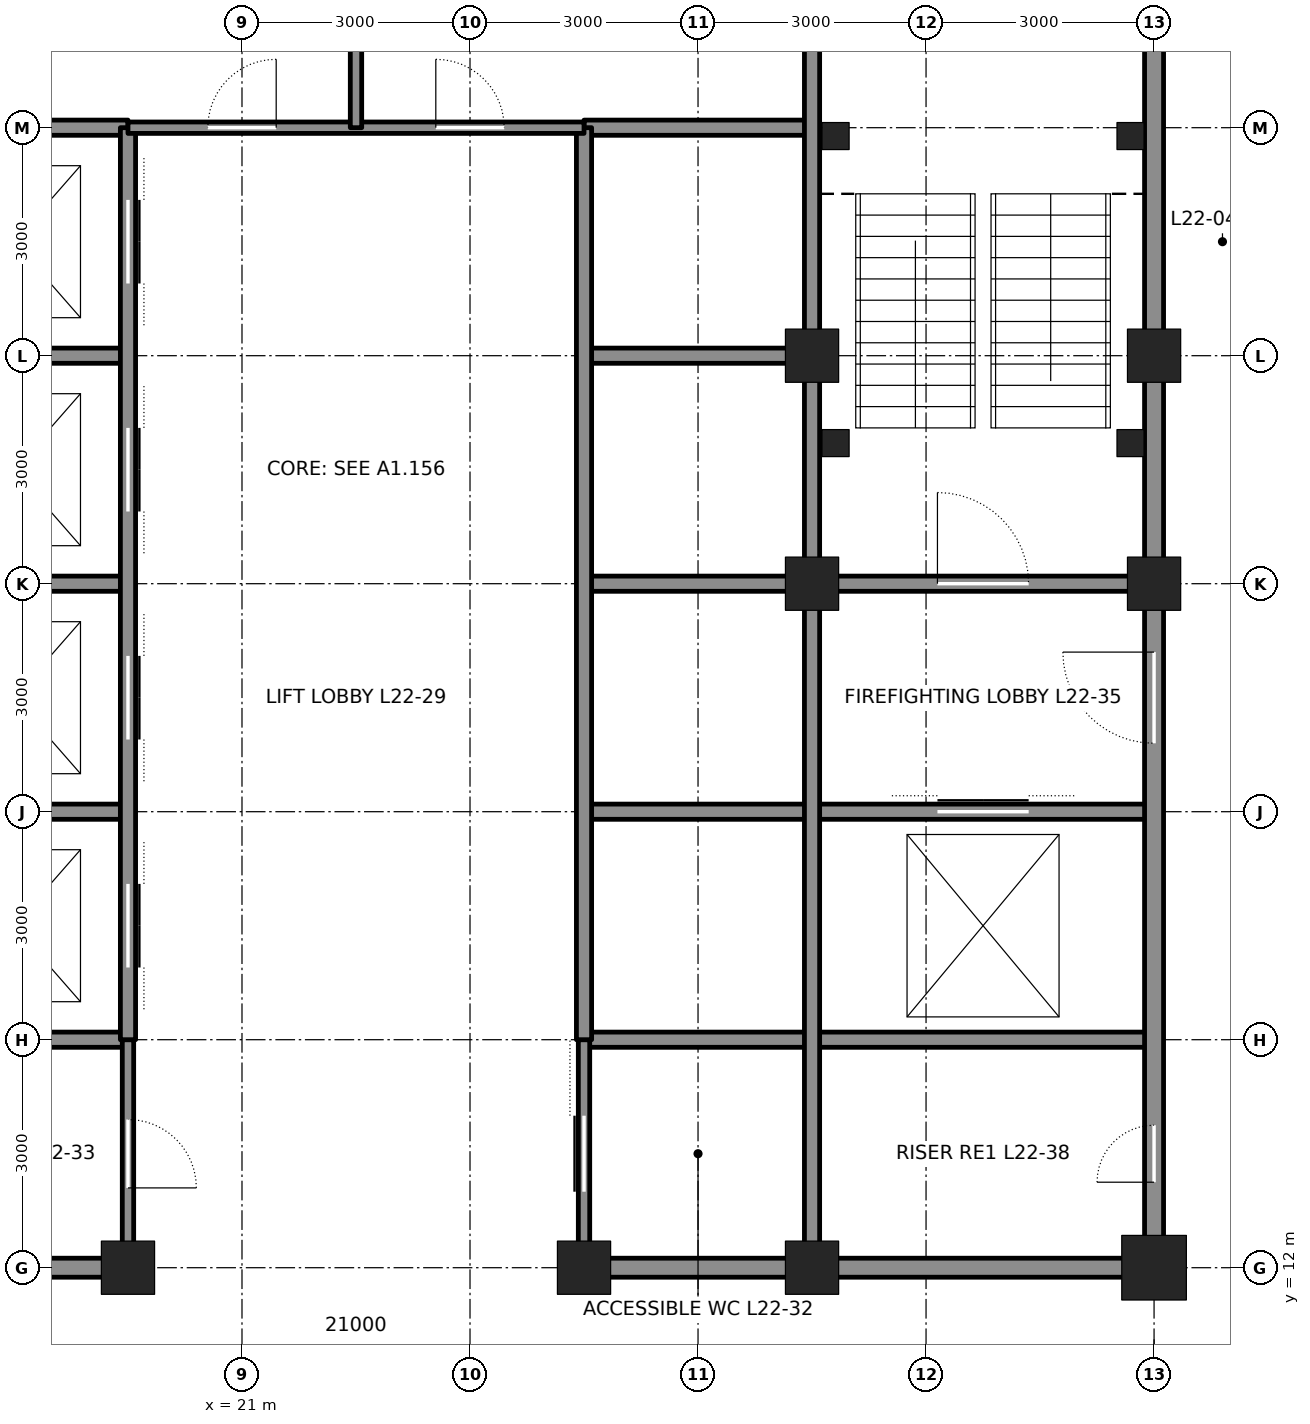
"""IFC4 building model, lengths in metres.
Left out: names, types, materials, properties, quantities, classifications, styles, units other than length and angle.
Written with IfcOpenShell. Run it as: python <this file> out.ifc"""

import sys

from ifc_helpers import new_model, si_unit, direction, frame, frame_2d, origin, origin_2d, place, context, subcontext, project, spatial, rectangle, hollow_rectangle, extrude, element, fill, save


model = new_model("IFC4")
c1 = context("Model", 3, precision=1e-05, world=origin(), true_north=direction((0.0, 1.0)))
c2 = subcontext(c1, "Body", "Model", "MODEL_VIEW")
j1 = project(units=[si_unit("LENGTHUNIT", "METRE"), si_unit("PLANEANGLEUNIT", "RADIAN")], contexts=[c1])
p1 = place(None, origin())
s1 = spatial("IfcSite", under=j1, at=p1, CompositionType="ELEMENT")
p2 = place(p1, origin())
s2 = spatial("IfcBuilding", under=s1, at=p2, CompositionType="ELEMENT")
p3 = place(p2, frame((0.0, 0.0, 106.8)))
s3 = spatial("IfcBuildingStorey", under=s2, at=p3, CompositionType="ELEMENT", Elevation=106.8)
for number, where, z_axis, x_axis in (
    (1, (19.5, 12.0, 0.0), (0.0, 0.0, 1.0), (1.0, 0.0, 0.0)),
    (2, (25.5, 12.0, 0.0), (0.0, 0.0, 1.0), (1.0, 0.0, 0.0)),
    (3, (28.5, 12.0, 0.0), (0.0, 0.0, 1.0), (1.0, 0.0, 0.0)),
):
    element("IfcColumn", number, at=place(p3, frame(where, z_axis=z_axis, x_axis=x_axis)), inside=s3, PredefinedType="COLUMN", context=c2, shape_type="SweptSolid", body=[
        extrude(hollow_rectangle(XDim=0.7, YDim=0.7, WallThickness=0.07, at=origin_2d()), origin(), (0.0, 0.0, 1.0), 4.2),
    ])
p4 = place(p3, frame((33.0, 12.0, 0.0), z_axis=(0.0, 0.0, 1.0), x_axis=(1.0, 0.0, 0.0)))
e4 = element("IfcColumn", 4, at=p4, inside=s3, PredefinedType="COLUMN", context=c2, shape_type="SweptSolid", body=[
    extrude(hollow_rectangle(XDim=0.85, YDim=0.85, WallThickness=0.085, at=origin_2d()), origin(), (0.0, 0.0, 1.0), 4.2),
])
for number, where, z_axis, x_axis in (
    (5, (33.0, 21.0, 0.0), (0.0, 0.0, 1.0), (1.0, 0.0, 0.0)),
    (6, (33.0, 24.0, 0.0), (0.0, 0.0, 1.0), (1.0, 0.0, 0.0)),
    (7, (28.5, 21.0, 0.0), (0.0, 0.0, 1.0), (1.0, 0.0, 0.0)),
    (8, (28.5, 24.0, 0.0), (0.0, 0.0, 1.0), (1.0, 0.0, 0.0)),
):
    element("IfcColumn", number, at=place(p3, frame(where, z_axis=z_axis, x_axis=x_axis)), inside=s3, PredefinedType="COLUMN", context=c2, shape_type="SweptSolid", body=[
        extrude(hollow_rectangle(XDim=0.7, YDim=0.7, WallThickness=0.07, at=origin_2d()), origin(), (0.0, 0.0, 1.0), 4.2),
    ])
for number, where, z_axis, x_axis in (
    (9, (16.75, 12.0, 0.0), (0.0, 0.0, 1.0), (1.0, 0.0, 0.0)),
    (10, (25.75, 12.0, 0.0), (0.0, 0.0, 1.0), (1.0, 0.0, 0.0)),
):
    element("IfcWall", number, at=place(p3, frame(where, z_axis=z_axis, x_axis=x_axis)), inside=s3, PredefinedType="SOLIDWALL", context=c2, shape_type="SweptSolid", body=[
        extrude(rectangle(XDim=2.5, YDim=0.25, at=frame_2d((1.25, 0.0))), origin(), (0.0, 0.0, 1.0), 3.181),
    ])
p5 = place(p3, frame((28.75, 12.0, 0.0), z_axis=(0.0, 0.0, 1.0), x_axis=(1.0, 0.0, 0.0)))
e11 = element("IfcWall", 11, at=p5, inside=s3, PredefinedType="SOLIDWALL", context=c2, shape_type="SweptSolid", body=[
    extrude(rectangle(XDim=4.0, YDim=0.25, at=frame_2d((2.0, 0.0))), origin(), (0.0, 0.0, 1.0), 3.181),
])
for number, where, z_axis, x_axis in (
    (12, (12.0, 15.0, 0.0), (0.0, 0.0, 1.0), (1.0, 0.0, 0.0)),
    (13, (25.5, 15.0, 0.0), (0.0, 0.0, 1.0), (1.0, 0.0, 0.0)),
):
    element("IfcWall", number, at=place(p3, frame(where, z_axis=z_axis, x_axis=x_axis)), inside=s3, PredefinedType="SOLIDWALL", context=c2, shape_type="SweptSolid", body=[
        extrude(rectangle(XDim=7.5, YDim=0.2, at=frame_2d((3.75, 0.0))), origin(), (0.0, 0.0, 1.0), 4.04),
    ])
for number, where, z_axis, x_axis in (
    (14, (16.75, 24.0, 0.0), (0.0, 0.0, 1.0), (1.0, 0.0, 0.0)),
    (15, (25.5, 24.0, 0.0), (0.0, 0.0, 1.0), (1.0, 0.0, 0.0)),
):
    element("IfcWall", number, at=place(p3, frame(where, z_axis=z_axis, x_axis=x_axis)), inside=s3, PredefinedType="SOLIDWALL", context=c2, shape_type="SweptSolid", body=[
        extrude(rectangle(XDim=2.75, YDim=0.2, at=frame_2d((1.375, 0.0))), origin(), (0.0, 0.0, 1.0), 3.09),
    ])
p6 = place(p3, frame((12.0, 27.0, 0.0), z_axis=(0.0, 0.0, 1.0), x_axis=(1.0, 0.0, 0.0)))
e16 = element("IfcWall", 16, at=p6, inside=s3, PredefinedType="SOLIDWALL", context=c2, shape_type="SweptSolid", body=[
    extrude(rectangle(XDim=7.5, YDim=0.2, at=frame_2d((3.75, 0.0))), origin(), (0.0, 0.0, 1.0), 4.04),
])
p7 = place(p6, frame((1.65, 0.0, 0.0)))
e17 = element("IfcOpeningElement", 17, at=p7, cuts=e16, PredefinedType="OPENING", context=c2, shape_type="SweptSolid", body=[
    extrude(rectangle(XDim=1.2, YDim=2.1, at=frame_2d((0.6, 1.05))), frame((0.0, 0.11, 0.0), z_axis=(0.0, -1.0, 0.0), x_axis=(1.0, 0.0, 0.0)), (0.0, 0.0, 1.0), 0.22),
])
for number, where, z_axis, x_axis in (
    (18, (25.5, 27.0, 0.0), (0.0, 0.0, 1.0), (1.0, 0.0, 0.0)),
    (19, (16.5, 18.0, 0.0), (0.0, 0.0, 1.0), (1.0, 0.0, 0.0)),
):
    element("IfcWall", number, at=place(p3, frame(where, z_axis=z_axis, x_axis=x_axis)), inside=s3, PredefinedType="SOLIDWALL", context=c2, shape_type="SweptSolid", body=[
        extrude(rectangle(XDim=3.0, YDim=0.2, at=frame_2d((1.5, 0.0))), origin(), (0.0, 0.0, 1.0), 4.04),
    ])
p8 = place(p3, frame((25.5, 18.0, 0.0), z_axis=(0.0, 0.0, 1.0), x_axis=(1.0, 0.0, 0.0)))
e20 = element("IfcWall", 20, at=p8, inside=s3, PredefinedType="SOLIDWALL", context=c2, shape_type="SweptSolid", body=[
    extrude(rectangle(XDim=7.5, YDim=0.2, at=frame_2d((3.75, 0.0))), origin(), (0.0, 0.0, 1.0), 4.04),
])
p9 = place(p8, frame((4.65, 0.0, 0.0)))
e21 = element("IfcOpeningElement", 21, at=p9, cuts=e20, PredefinedType="OPENING", context=c2, shape_type="SweptSolid", body=[
    extrude(rectangle(XDim=1.2, YDim=2.1, at=frame_2d((0.6, 1.05))), frame((0.0, 0.11, 0.0), z_axis=(0.0, -1.0, 0.0), x_axis=(1.0, 0.0, 0.0)), (0.0, 0.0, 1.0), 0.22),
])
for number, where, z_axis, x_axis in (
    (22, (16.75, 21.0, 0.0), (0.0, 0.0, 1.0), (1.0, 0.0, 0.0)),
    (23, (25.5, 21.0, 0.0), (0.0, 0.0, 1.0), (1.0, 0.0, 0.0)),
):
    element("IfcWall", number, at=place(p3, frame(where, z_axis=z_axis, x_axis=x_axis)), inside=s3, PredefinedType="SOLIDWALL", context=c2, shape_type="SweptSolid", body=[
        extrude(rectangle(XDim=2.75, YDim=0.2, at=frame_2d((1.375, 0.0))), origin(), (0.0, 0.0, 1.0), 3.09),
    ])
p10 = place(p3, frame((28.75, 21.0, 0.0), z_axis=(0.0, 0.0, 1.0), x_axis=(1.0, 0.0, 0.0)))
e24 = element("IfcWall", 24, at=p10, inside=s3, PredefinedType="SOLIDWALL", context=c2, shape_type="SweptSolid", body=[
    extrude(rectangle(XDim=4.0, YDim=0.2, at=frame_2d((2.0, 0.0))), origin(), (0.0, 0.0, 1.0), 3.09),
])
p11 = place(p10, frame((1.4, 0.0, 0.0)))
e25 = element("IfcOpeningElement", 25, at=p11, cuts=e24, PredefinedType="OPENING", context=c2, shape_type="SweptSolid", body=[
    extrude(rectangle(XDim=1.2, YDim=2.1, at=frame_2d((0.6, 1.05))), frame((0.0, 0.11, 0.0), z_axis=(0.0, -1.0, 0.0), x_axis=(1.0, 0.0, 0.0)), (0.0, 0.0, 1.0), 0.22),
])
p12 = place(p3, frame((19.5, 12.25, 0.0), z_axis=(0.0, 0.0, 1.0), x_axis=(0.0, 1.0, 0.0)))
e26 = element("IfcWall", 26, at=p12, inside=s3, PredefinedType="PARTITIONING", context=c2, shape_type="SweptSolid", body=[
    extrude(rectangle(XDim=2.75, YDim=0.15, at=frame_2d((1.375, 0.0))), origin(), (0.0, 0.0, 1.0), 3.064),
])
p13 = place(p12, frame((0.8, 0.0, 0.0)))
e27 = element("IfcOpeningElement", 27, at=p13, cuts=e26, PredefinedType="OPENING", context=c2, shape_type="SweptSolid", body=[
    extrude(rectangle(XDim=0.9, YDim=2.1, at=frame_2d((0.45, 1.05))), frame((0.0, 0.085, 0.0), z_axis=(0.0, -1.0, 0.0), x_axis=(1.0, 0.0, 0.0)), (0.0, 0.0, 1.0), 0.17),
])
p14 = place(p3, frame((19.5, 15.0, 0.0), z_axis=(0.0, 0.0, 1.0), x_axis=(0.0, 1.0, 0.0)))
e28 = element("IfcWall", 28, at=p14, inside=s3, PredefinedType="SOLIDWALL", context=c2, shape_type="SweptSolid", body=[
    extrude(rectangle(XDim=12.0, YDim=0.2, at=frame_2d((6.0, 0.0))), origin(), (0.0, 0.0, 1.0), 3.064),
])
p15 = place(p14, frame((0.95, 0.0, 0.0)))
e29 = element("IfcOpeningElement", 29, at=p15, cuts=e28, PredefinedType="OPENING", context=c2, shape_type="SweptSolid", body=[
    extrude(rectangle(XDim=1.1, YDim=2.1, at=frame_2d((0.55, 1.05))), frame((0.0, 0.11, 0.0), z_axis=(0.0, -1.0, 0.0), x_axis=(1.0, 0.0, 0.0)), (0.0, 0.0, 1.0), 0.22),
])
p16 = place(p14, frame((3.95, 0.0, 0.0)))
e30 = element("IfcOpeningElement", 30, at=p16, cuts=e28, PredefinedType="OPENING", context=c2, shape_type="SweptSolid", body=[
    extrude(rectangle(XDim=1.1, YDim=2.1, at=frame_2d((0.55, 1.05))), frame((0.0, 0.11, 0.0), z_axis=(0.0, -1.0, 0.0), x_axis=(1.0, 0.0, 0.0)), (0.0, 0.0, 1.0), 0.22),
])
p17 = place(p14, frame((6.95, 0.0, 0.0)))
e31 = element("IfcOpeningElement", 31, at=p17, cuts=e28, PredefinedType="OPENING", context=c2, shape_type="SweptSolid", body=[
    extrude(rectangle(XDim=1.1, YDim=2.1, at=frame_2d((0.55, 1.05))), frame((0.0, 0.11, 0.0), z_axis=(0.0, -1.0, 0.0), x_axis=(1.0, 0.0, 0.0)), (0.0, 0.0, 1.0), 0.22),
])
p18 = place(p14, frame((9.95, 0.0, 0.0)))
e32 = element("IfcOpeningElement", 32, at=p18, cuts=e28, PredefinedType="OPENING", context=c2, shape_type="SweptSolid", body=[
    extrude(rectangle(XDim=1.1, YDim=2.1, at=frame_2d((0.55, 1.05))), frame((0.0, 0.11, 0.0), z_axis=(0.0, -1.0, 0.0), x_axis=(1.0, 0.0, 0.0)), (0.0, 0.0, 1.0), 0.22),
])
p19 = place(p3, frame((25.5, 12.25, 0.0), z_axis=(0.0, 0.0, 1.0), x_axis=(0.0, 1.0, 0.0)))
e33 = element("IfcWall", 33, at=p19, inside=s3, PredefinedType="PARTITIONING", context=c2, shape_type="SweptSolid", body=[
    extrude(rectangle(XDim=2.75, YDim=0.15, at=frame_2d((1.375, 0.0))), origin(), (0.0, 0.0, 1.0), 3.064),
])
p20 = place(p19, frame((0.75, 0.0, 0.0)))
e34 = element("IfcOpeningElement", 34, at=p20, cuts=e33, PredefinedType="OPENING", context=c2, shape_type="SweptSolid", body=[
    extrude(rectangle(XDim=1.0, YDim=2.1, at=frame_2d((0.5, 1.05))), frame((0.0, 0.085, 0.0), z_axis=(0.0, -1.0, 0.0), x_axis=(1.0, 0.0, 0.0)), (0.0, 0.0, 1.0), 0.17),
])
p21 = place(p3, frame((25.5, 15.0, 0.0), z_axis=(0.0, 0.0, 1.0), x_axis=(0.0, 1.0, 0.0)))
e35 = element("IfcWall", 35, at=p21, inside=s3, PredefinedType="SOLIDWALL", context=c2, shape_type="SweptSolid", body=[
    extrude(rectangle(XDim=12.0, YDim=0.2, at=frame_2d((6.0, 0.0))), origin(), (0.0, 0.0, 1.0), 3.064),
])
p22 = place(p3, frame((28.5, 12.25, 0.0), z_axis=(0.0, 0.0, 1.0), x_axis=(0.0, 1.0, 0.0)))
e36 = element("IfcWall", 36, at=p22, inside=s3, PredefinedType="SOLIDWALL", context=c2, shape_type="SweptSolid", body=[
    extrude(rectangle(XDim=8.5, YDim=0.2, at=frame_2d((4.25, 0.0))), origin(), (0.0, 0.0, 1.0), 3.113),
])
p23 = place(p3, frame((28.5, 21.25, 0.0), z_axis=(0.0, 0.0, 1.0), x_axis=(0.0, 1.0, 0.0)))
e37 = element("IfcWall", 37, at=p23, inside=s3, PredefinedType="SOLIDWALL", context=c2, shape_type="SweptSolid", body=[
    extrude(rectangle(XDim=2.5, YDim=0.2, at=frame_2d((1.25, 0.0))), origin(), (0.0, 0.0, 1.0), 3.113),
])
p24 = place(p3, frame((28.5, 24.25, 0.0), z_axis=(0.0, 0.0, 1.0), x_axis=(0.0, 1.0, 0.0)))
e38 = element("IfcWall", 38, at=p24, inside=s3, PredefinedType="SOLIDWALL", context=c2, shape_type="SweptSolid", body=[
    extrude(rectangle(XDim=8.5, YDim=0.2, at=frame_2d((4.25, 0.0))), origin(), (0.0, 0.0, 1.0), 3.113),
])
p25 = place(p3, frame((33.0, 12.25, 0.0), z_axis=(0.0, 0.0, 1.0), x_axis=(0.0, 1.0, 0.0)))
e39 = element("IfcWall", 39, at=p25, inside=s3, PredefinedType="SOLIDWALL", context=c2, shape_type="SweptSolid", body=[
    extrude(rectangle(XDim=8.5, YDim=0.25, at=frame_2d((4.25, 0.0))), origin(), (0.0, 0.0, 1.0), 3.113),
])
p26 = place(p25, frame((6.65, 0.0, 0.0)))
e40 = element("IfcOpeningElement", 40, at=p26, cuts=e39, PredefinedType="OPENING", context=c2, shape_type="SweptSolid", body=[
    extrude(rectangle(XDim=1.2, YDim=2.1, at=frame_2d((0.6, 1.05))), frame((0.0, 0.135, 0.0), z_axis=(0.0, -1.0, 0.0), x_axis=(1.0, 0.0, 0.0)), (0.0, 0.0, 1.0), 0.27),
])
p27 = place(p25, frame((0.875, 0.0, 0.0)))
e41 = element("IfcOpeningElement", 41, at=p27, cuts=e39, PredefinedType="OPENING", context=c2, shape_type="SweptSolid", body=[
    extrude(rectangle(XDim=0.75, YDim=2.1, at=frame_2d((0.375, 1.05))), frame((0.0, 0.135, 0.0), z_axis=(0.0, -1.0, 0.0), x_axis=(1.0, 0.0, 0.0)), (0.0, 0.0, 1.0), 0.27),
])
p28 = place(p3, frame((33.0, 21.25, 0.0), z_axis=(0.0, 0.0, 1.0), x_axis=(0.0, 1.0, 0.0)))
e42 = element("IfcWall", 42, at=p28, inside=s3, PredefinedType="SOLIDWALL", context=c2, shape_type="SweptSolid", body=[
    extrude(rectangle(XDim=2.5, YDim=0.25, at=frame_2d((1.25, 0.0))), origin(), (0.0, 0.0, 1.0), 3.113),
])
p29 = place(p3, frame((33.0, 24.25, 0.0), z_axis=(0.0, 0.0, 1.0), x_axis=(0.0, 1.0, 0.0)))
e43 = element("IfcWall", 43, at=p29, inside=s3, PredefinedType="SOLIDWALL", context=c2, shape_type="SweptSolid", body=[
    extrude(rectangle(XDim=8.5, YDim=0.25, at=frame_2d((4.25, 0.0))), origin(), (0.0, 0.0, 1.0), 3.113),
])
p30 = place(p29, frame((6.875, 0.0, 0.0)))
e44 = element("IfcOpeningElement", 44, at=p30, cuts=e43, PredefinedType="OPENING", context=c2, shape_type="SweptSolid", body=[
    extrude(rectangle(XDim=0.75, YDim=2.1, at=frame_2d((0.375, 1.05))), frame((0.0, 0.135, 0.0), z_axis=(0.0, -1.0, 0.0), x_axis=(1.0, 0.0, 0.0)), (0.0, 0.0, 1.0), 0.27),
])
p31 = place(p3, frame((19.5, 27.0, 0.0), z_axis=(0.0, 0.0, 1.0), x_axis=(1.0, 0.0, 0.0)))
e45 = element("IfcWall", 45, at=p31, inside=s3, PredefinedType="PARTITIONING", context=c2, shape_type="SweptSolid", body=[
    extrude(rectangle(XDim=6.0, YDim=0.15, at=frame_2d((3.0, 0.0))), origin(), (0.0, 0.0, 1.0), 4.04),
])
p32 = place(p31, frame((1.05, 0.0, 0.0)))
e46 = element("IfcOpeningElement", 46, at=p32, cuts=e45, PredefinedType="OPENING", context=c2, shape_type="SweptSolid", body=[
    extrude(rectangle(XDim=0.9, YDim=2.1, at=frame_2d((0.45, 1.05))), frame((0.0, 0.085, 0.0), z_axis=(0.0, -1.0, 0.0), x_axis=(1.0, 0.0, 0.0)), (0.0, 0.0, 1.0), 0.17),
])
p33 = place(p31, frame((4.05, 0.0, 0.0)))
e47 = element("IfcOpeningElement", 47, at=p33, cuts=e45, PredefinedType="OPENING", context=c2, shape_type="SweptSolid", body=[
    extrude(rectangle(XDim=0.9, YDim=2.1, at=frame_2d((0.45, 1.05))), frame((0.0, 0.085, 0.0), z_axis=(0.0, -1.0, 0.0), x_axis=(1.0, 0.0, 0.0)), (0.0, 0.0, 1.0), 0.17),
])
p34 = place(p3, frame((22.5, 27.0, 0.0), z_axis=(0.0, 0.0, 1.0), x_axis=(0.0, 1.0, 0.0)))
e48 = element("IfcWall", 48, at=p34, inside=s3, PredefinedType="PARTITIONING", context=c2, shape_type="SweptSolid", body=[
    extrude(rectangle(XDim=6.0, YDim=0.15, at=frame_2d((3.0, 0.0))), origin(), (0.0, 0.0, 1.0), 4.04),
])
for number, where, z_axis, x_axis in (
    (49, (28.81, 26.89, 0.0), (0.0, 0.0, 1.0), (1.0, 0.0, 0.0)),
    (50, (32.69, 26.89, 0.0), (0.0, 0.0, 1.0), (1.0, 0.0, 0.0)),
    (51, (28.81, 22.85, 0.0), (0.0, 0.0, 1.0), (1.0, 0.0, 0.0)),
    (52, (32.69, 22.85, 0.0), (0.0, 0.0, 1.0), (1.0, 0.0, 0.0)),
):
    element("IfcColumn", number, at=place(p3, frame(where, z_axis=z_axis, x_axis=x_axis)), inside=s3, PredefinedType="COLUMN", context=c2, shape_type="SweptSolid", body=[
        extrude(hollow_rectangle(XDim=0.356, YDim=0.356, WallThickness=0.015, at=origin_2d()), origin(), (0.0, 0.0, 1.0), 4.2),
    ])
p35 = place(p11, origin())
e53 = element("IfcDoor", 53, at=p35, inside=s3, OperationType="SINGLE_SWING_LEFT", PredefinedType="DOOR", context=c2, shape_type="SweptSolid", body=[
    extrude(rectangle(XDim=1.2, YDim=2.1, at=frame_2d((0.6, 1.05))), frame((0.0, 0.025, 0.0), z_axis=(0.0, -1.0, 0.0), x_axis=(1.0, 0.0, 0.0)), (0.0, 0.0, 1.0), 0.05),
])
fill(e25, e53)
p36 = place(p26, origin())
e54 = element("IfcDoor", 54, at=p36, inside=s3, OperationType="SINGLE_SWING_RIGHT", PredefinedType="DOOR", context=c2, shape_type="SweptSolid", body=[
    extrude(rectangle(XDim=1.2, YDim=2.1, at=frame_2d((0.6, 1.05))), frame((0.0, 0.025, 0.0), z_axis=(0.0, -1.0, 0.0), x_axis=(1.0, 0.0, 0.0)), (0.0, 0.0, 1.0), 0.05),
])
fill(e40, e54)
p37 = place(p9, origin())
e55 = element("IfcDoor", 55, at=p37, inside=s3, OperationType="DOUBLE_DOOR_SLIDING", PredefinedType="DOOR", context=c2, shape_type="SweptSolid", body=[
    extrude(rectangle(XDim=1.2, YDim=2.1, at=frame_2d((0.6, 1.05))), frame((0.0, 0.025, 0.0), z_axis=(0.0, -1.0, 0.0), x_axis=(1.0, 0.0, 0.0)), (0.0, 0.0, 1.0), 0.05),
])
fill(e21, e55)
p38 = place(p27, origin())
e56 = element("IfcDoor", 56, at=p38, inside=s3, OperationType="SINGLE_SWING_LEFT", PredefinedType="DOOR", context=c2, shape_type="SweptSolid", body=[
    extrude(rectangle(XDim=0.75, YDim=2.1, at=frame_2d((0.375, 1.05))), frame((0.0, 0.025, 0.0), z_axis=(0.0, -1.0, 0.0), x_axis=(1.0, 0.0, 0.0)), (0.0, 0.0, 1.0), 0.05),
])
fill(e41, e56)
p39 = place(p32, origin())
e57 = element("IfcDoor", 57, at=p39, inside=s3, OperationType="SINGLE_SWING_RIGHT", PredefinedType="DOOR", context=c2, shape_type="SweptSolid", body=[
    extrude(rectangle(XDim=0.9, YDim=2.1, at=frame_2d((0.45, 1.05))), frame((0.0, 0.025, 0.0), z_axis=(0.0, -1.0, 0.0), x_axis=(1.0, 0.0, 0.0)), (0.0, 0.0, 1.0), 0.05),
])
fill(e46, e57)
p40 = place(p33, origin())
e58 = element("IfcDoor", 58, at=p40, inside=s3, OperationType="SINGLE_SWING_LEFT", PredefinedType="DOOR", context=c2, shape_type="SweptSolid", body=[
    extrude(rectangle(XDim=0.9, YDim=2.1, at=frame_2d((0.45, 1.05))), frame((0.0, 0.025, 0.0), z_axis=(0.0, -1.0, 0.0), x_axis=(1.0, 0.0, 0.0)), (0.0, 0.0, 1.0), 0.05),
])
fill(e47, e58)
p41 = place(p20, origin())
e59 = element("IfcDoor", 59, at=p41, inside=s3, OperationType="SLIDING_TO_LEFT", PredefinedType="DOOR", context=c2, shape_type="SweptSolid", body=[
    extrude(rectangle(XDim=1.0, YDim=2.1, at=frame_2d((0.5, 1.05))), frame((0.0, 0.025, 0.0), z_axis=(0.0, -1.0, 0.0), x_axis=(1.0, 0.0, 0.0)), (0.0, 0.0, 1.0), 0.05),
])
fill(e34, e59)
p42 = place(p13, frame((0.9, 0.0, 0.0), z_axis=(0.0, 0.0, 1.0), x_axis=(-1.0, 0.0, 0.0)))
e60 = element("IfcDoor", 60, at=p42, inside=s3, OperationType="SINGLE_SWING_RIGHT", PredefinedType="DOOR", context=c2, shape_type="SweptSolid", body=[
    extrude(rectangle(XDim=0.9, YDim=2.1, at=frame_2d((0.45, 1.05))), frame((0.0, 0.025, 0.0), z_axis=(0.0, -1.0, 0.0), x_axis=(1.0, 0.0, 0.0)), (0.0, 0.0, 1.0), 0.05),
])
fill(e27, e60)
p43 = place(p15, origin())
e61 = element("IfcDoor", 61, at=p43, inside=s3, OperationType="DOUBLE_DOOR_SLIDING", PredefinedType="DOOR", context=c2, shape_type="SweptSolid", body=[
    extrude(rectangle(XDim=1.1, YDim=2.1, at=frame_2d((0.55, 1.05))), frame((0.0, 0.025, 0.0), z_axis=(0.0, -1.0, 0.0), x_axis=(1.0, 0.0, 0.0)), (0.0, 0.0, 1.0), 0.05),
])
fill(e29, e61)
p44 = place(p16, origin())
e62 = element("IfcDoor", 62, at=p44, inside=s3, OperationType="DOUBLE_DOOR_SLIDING", PredefinedType="DOOR", context=c2, shape_type="SweptSolid", body=[
    extrude(rectangle(XDim=1.1, YDim=2.1, at=frame_2d((0.55, 1.05))), frame((0.0, 0.025, 0.0), z_axis=(0.0, -1.0, 0.0), x_axis=(1.0, 0.0, 0.0)), (0.0, 0.0, 1.0), 0.05),
])
fill(e30, e62)
p45 = place(p17, origin())
e63 = element("IfcDoor", 63, at=p45, inside=s3, OperationType="DOUBLE_DOOR_SLIDING", PredefinedType="DOOR", context=c2, shape_type="SweptSolid", body=[
    extrude(rectangle(XDim=1.1, YDim=2.1, at=frame_2d((0.55, 1.05))), frame((0.0, 0.025, 0.0), z_axis=(0.0, -1.0, 0.0), x_axis=(1.0, 0.0, 0.0)), (0.0, 0.0, 1.0), 0.05),
])
fill(e31, e63)
p46 = place(p18, origin())
e64 = element("IfcDoor", 64, at=p46, inside=s3, OperationType="DOUBLE_DOOR_SLIDING", PredefinedType="DOOR", context=c2, shape_type="SweptSolid", body=[
    extrude(rectangle(XDim=1.1, YDim=2.1, at=frame_2d((0.55, 1.05))), frame((0.0, 0.025, 0.0), z_axis=(0.0, -1.0, 0.0), x_axis=(1.0, 0.0, 0.0)), (0.0, 0.0, 1.0), 0.05),
])
fill(e32, e64)
save(model, sys.argv[1])
